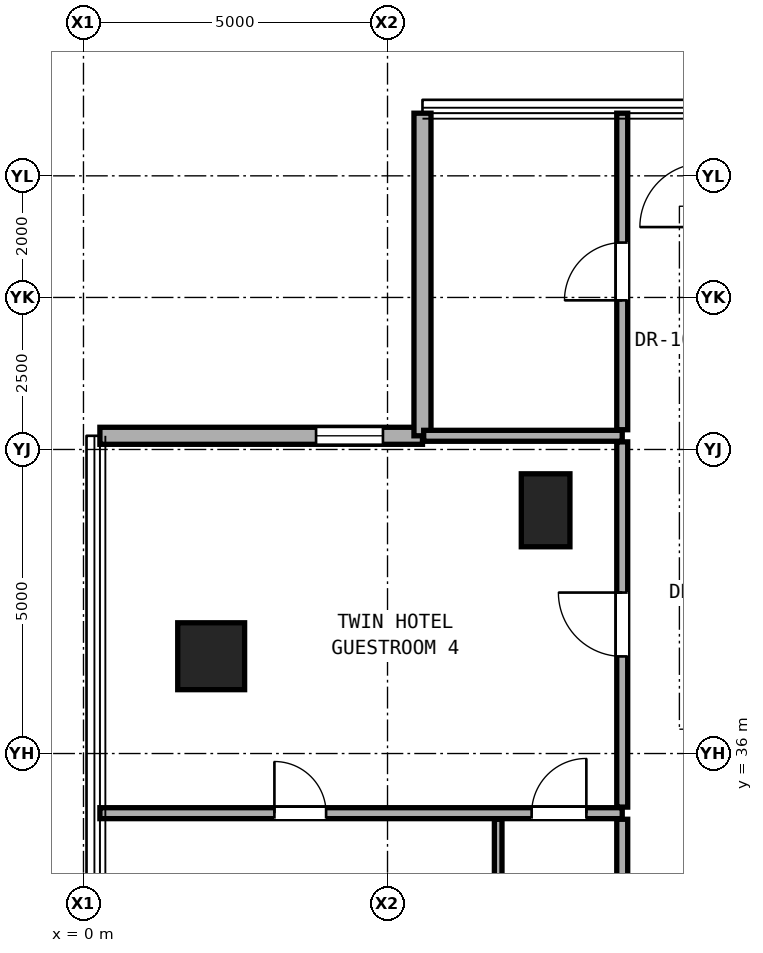
"""IFC4 building model, lengths in metres.
Left out: names, types, materials, properties, quantities, classifications, styles, units other than length and angle.
Written with IfcOpenShell. Run it as: python <this file> out.ifc"""

import sys

from ifc_helpers import new_model, si_unit, direction, frame, frame_2d, origin, origin_2d, place, context, subcontext, project, spatial, rectangle, hollow_rectangle, extrude, element, fill, save


model = new_model("IFC4")
c1 = context("Model", 3, precision=1e-05, world=origin(), true_north=direction((0.0, 1.0)))
c2 = subcontext(c1, "Body", "Model", "MODEL_VIEW")
j1 = project(units=[si_unit("LENGTHUNIT", "METRE"), si_unit("PLANEANGLEUNIT", "RADIAN")], contexts=[c1])
p1 = place(None, origin())
s1 = spatial("IfcSite", under=j1, at=p1, CompositionType="ELEMENT")
p2 = place(p1, origin())
s2 = spatial("IfcBuilding", under=s1, at=p2, CompositionType="ELEMENT")
p3 = place(p2, frame((0.0, 0.0, 88.4)))
s3 = spatial("IfcBuildingStorey", under=s2, at=p3, CompositionType="ELEMENT", Elevation=88.4)
p4 = place(p3, frame((2.1, 37.6, 0.0), z_axis=(0.0, 0.0, 1.0), x_axis=(1.0, 0.0, 0.0)))
e1 = element("IfcColumn", 1, at=p4, inside=s3, PredefinedType="COLUMN", context=c2, shape_type="SweptSolid", body=[
    extrude(hollow_rectangle(XDim=1.1, YDim=1.1, WallThickness=0.06, at=origin_2d()), origin(), (0.0, 0.0, 1.0), 3.3),
])
p5 = place(p3, frame((7.6, 40.0, 0.0), z_axis=(0.0, 0.0, 1.0), x_axis=(1.0, 0.0, 0.0)))
e2 = element("IfcColumn", 2, at=p5, inside=s3, PredefinedType="PILASTER", context=c2, shape_type="SweptSolid", body=[
    extrude(rectangle(XDim=0.8, YDim=1.2, at=origin_2d()), origin(), (0.0, 0.0, 1.0), 3.3),
])
p6 = place(p3, frame((5.575, 41.225, 0.0), z_axis=(0.0, 0.0, 1.0), x_axis=(-1.0, 0.0, 0.0)))
e3 = element("IfcWall", 3, at=p6, inside=s3, PredefinedType="SOLIDWALL", context=c2, shape_type="SweptSolid", body=[
    extrude(rectangle(XDim=5.305, YDim=0.28, at=frame_2d((2.652, 0.0))), origin(), (0.0, 0.0, 1.0), 3.06),
])
p7 = place(p6, frame((0.65, 0.0, 0.85)))
e4 = element("IfcOpeningElement", 4, at=p7, cuts=e3, PredefinedType="OPENING", context=c2, shape_type="SweptSolid", body=[
    extrude(rectangle(XDim=1.1, YDim=2.0, at=frame_2d((0.55, 1.0))), frame((0.0, 0.15, 0.0), z_axis=(0.0, -1.0, 0.0), x_axis=(1.0, 0.0, 0.0)), (0.0, 0.0, 1.0), 0.3),
])
p8 = place(p3, frame((5.575, 46.53, 0.0), z_axis=(0.0, 0.0, 1.0), x_axis=(0.0, -1.0, 0.0)))
e5 = element("IfcWall", 5, at=p8, inside=s3, PredefinedType="SOLIDWALL", context=c2, shape_type="SweptSolid", body=[
    extrude(rectangle(XDim=5.305, YDim=0.28, at=frame_2d((2.652, 0.0))), origin(), (0.0, 0.0, 1.0), 3.06),
])
p9 = place(p3, frame((0.27, 35.019, 0.0), z_axis=(0.0, 0.0, 1.0), x_axis=(1.0, 0.0, 0.0)))
e6 = element("IfcWall", 6, at=p9, inside=s3, PredefinedType="PARTITIONING", context=c2, shape_type="SweptSolid", body=[
    extrude(rectangle(XDim=8.59, YDim=0.18, at=frame_2d((4.295, 0.0))), origin(), (0.0, 0.0, 1.0), 2.145),
])
p10 = place(p9, frame((2.87, 0.0, 0.0)))
e7 = element("IfcOpeningElement", 7, at=p10, cuts=e6, PredefinedType="OPENING", context=c2, shape_type="SweptSolid", body=[
    extrude(rectangle(XDim=0.85, YDim=2.01, at=frame_2d((0.425, 1.005))), frame((0.0, 0.1, 0.0), z_axis=(0.0, -1.0, 0.0), x_axis=(1.0, 0.0, 0.0)), (0.0, 0.0, 1.0), 0.2),
])
p11 = place(p9, frame((7.1, 0.0, 0.0)))
e8 = element("IfcOpeningElement", 8, at=p11, cuts=e6, PredefinedType="OPENING", context=c2, shape_type="SweptSolid", body=[
    extrude(rectangle(XDim=0.9, YDim=2.1, at=frame_2d((0.45, 1.05))), frame((0.0, 0.1, 0.0), z_axis=(0.0, -1.0, 0.0), x_axis=(1.0, 0.0, 0.0)), (0.0, 0.0, 1.0), 0.2),
])
p12 = place(p3, frame((5.595, 41.225, 0.0), z_axis=(0.0, 0.0, 1.0), x_axis=(1.0, 0.0, 0.0)))
e9 = element("IfcWall", 9, at=p12, inside=s3, PredefinedType="PARTITIONING", context=c2, shape_type="SweptSolid", body=[
    extrude(rectangle(XDim=3.265, YDim=0.18, at=frame_2d((1.633, 0.0))), origin(), (0.0, 0.0, 1.0), 3.08),
])
p13 = place(p3, frame((6.82, 32.819, 0.0), z_axis=(0.0, 0.0, 1.0), x_axis=(0.0, 1.0, 0.0)))
e10 = element("IfcWall", 10, at=p13, inside=s3, PredefinedType="PARTITIONING", context=c2, shape_type="SweptSolid", body=[
    extrude(rectangle(XDim=2.1, YDim=0.125, at=frame_2d((1.05, 0.0))), origin(), (0.0, 0.0, 1.0), 3.08),
])
p14 = place(p3, frame((8.86, 32.819, 0.0), z_axis=(0.0, 0.0, 1.0), x_axis=(0.0, 1.0, 0.0)))
e11 = element("IfcWall", 11, at=p14, inside=s3, PredefinedType="PARTITIONING", context=c2, shape_type="SweptSolid", body=[
    extrude(rectangle(XDim=2.1, YDim=0.18, at=frame_2d((1.05, 0.0))), origin(), (0.0, 0.0, 1.0), 3.08),
])
p15 = place(p3, frame((8.86, 35.119, 0.0), z_axis=(0.0, 0.0, 1.0), x_axis=(0.0, 1.0, 0.0)))
e12 = element("IfcWall", 12, at=p15, inside=s3, PredefinedType="PARTITIONING", context=c2, shape_type="SweptSolid", body=[
    extrude(rectangle(XDim=6.006, YDim=0.18, at=frame_2d((3.003, 0.0))), origin(), (0.0, 0.0, 1.0), 2.456),
])
p16 = place(p15, frame((2.478, 0.0, 0.0)))
e13 = element("IfcOpeningElement", 13, at=p16, cuts=e12, PredefinedType="OPENING", context=c2, shape_type="SweptSolid", body=[
    extrude(rectangle(XDim=1.05, YDim=2.2, at=frame_2d((0.525, 1.1))), frame((0.0, 0.1, 0.0), z_axis=(0.0, -1.0, 0.0), x_axis=(1.0, 0.0, 0.0)), (0.0, 0.0, 1.0), 0.2),
])
p17 = place(p3, frame((8.86, 41.325, 0.0), z_axis=(0.0, 0.0, 1.0), x_axis=(0.0, 1.0, 0.0)))
e14 = element("IfcWall", 14, at=p17, inside=s3, PredefinedType="PARTITIONING", context=c2, shape_type="SweptSolid", body=[
    extrude(rectangle(XDim=5.205, YDim=0.18, at=frame_2d((2.603, 0.0))), origin(), (0.0, 0.0, 1.0), 3.08),
])
p18 = place(p17, frame((2.127, 0.0, 0.0)))
e15 = element("IfcOpeningElement", 15, at=p18, cuts=e14, PredefinedType="OPENING", context=c2, shape_type="SweptSolid", body=[
    extrude(rectangle(XDim=0.95, YDim=2.15, at=frame_2d((0.475, 1.075))), frame((0.0, 0.1, 0.0), z_axis=(0.0, -1.0, 0.0), x_axis=(1.0, 0.0, 0.0)), (0.0, 0.0, 1.0), 0.2),
])
p19 = place(p7, origin())
e16 = element("IfcWindow", 16, at=p19, inside=s3, PartitioningType="SINGLE_PANEL", PredefinedType="WINDOW", context=c2, shape_type="SweptSolid", body=[
    extrude(rectangle(XDim=1.1, YDim=2.0, at=frame_2d((0.55, 1.0))), frame((0.0, 0.03, 0.0), z_axis=(0.0, -1.0, 0.0), x_axis=(1.0, 0.0, 0.0)), (0.0, 0.0, 1.0), 0.06),
])
fill(e4, e16)
p20 = place(p16, origin())
e17 = element("IfcDoor", 17, at=p20, inside=s3, OperationType="SINGLE_SWING_RIGHT", PredefinedType="DOOR", context=c2, shape_type="SweptSolid", body=[
    extrude(rectangle(XDim=1.05, YDim=2.2, at=frame_2d((0.525, 1.1))), frame((0.0, 0.025, 0.0), z_axis=(0.0, -1.0, 0.0), x_axis=(1.0, 0.0, 0.0)), (0.0, 0.0, 1.0), 0.05),
])
fill(e13, e17)
p21 = place(p10, origin())
e18 = element("IfcDoor", 18, at=p21, inside=s3, OperationType="SINGLE_SWING_LEFT", PredefinedType="DOOR", context=c2, shape_type="SweptSolid", body=[
    extrude(rectangle(XDim=0.85, YDim=2.01, at=frame_2d((0.425, 1.005))), frame((0.0, 0.025, 0.0), z_axis=(0.0, -1.0, 0.0), x_axis=(1.0, 0.0, 0.0)), (0.0, 0.0, 1.0), 0.05),
])
fill(e7, e18)
p22 = place(p11, origin())
e19 = element("IfcDoor", 19, at=p22, inside=s3, OperationType="SINGLE_SWING_RIGHT", PredefinedType="DOOR", context=c2, shape_type="SweptSolid", body=[
    extrude(rectangle(XDim=0.9, YDim=2.1, at=frame_2d((0.45, 1.05))), frame((0.0, 0.025, 0.0), z_axis=(0.0, -1.0, 0.0), x_axis=(1.0, 0.0, 0.0)), (0.0, 0.0, 1.0), 0.05),
])
fill(e8, e19)
p23 = place(p18, origin())
e20 = element("IfcDoor", 20, at=p23, inside=s3, OperationType="SINGLE_SWING_LEFT", PredefinedType="DOOR", context=c2, shape_type="SweptSolid", body=[
    extrude(rectangle(XDim=0.95, YDim=2.15, at=frame_2d((0.475, 1.075))), frame((0.0, 0.025, 0.0), z_axis=(0.0, -1.0, 0.0), x_axis=(1.0, 0.0, 0.0)), (0.0, 0.0, 1.0), 0.05),
])
fill(e15, e20)
save(model, sys.argv[1])
